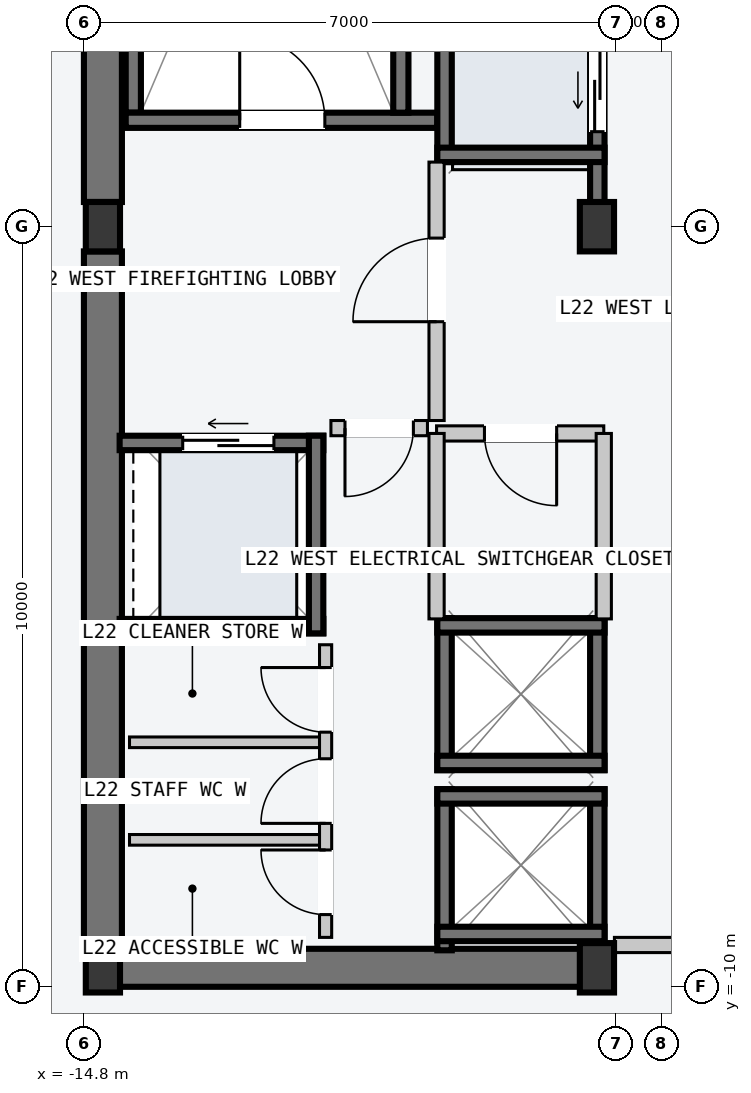
"""IFC4 building model, lengths in metres.
Left out: names, types, materials, properties, quantities, classifications, styles, units other than length and angle.
Written with IfcOpenShell. Run it as: python <this file> out.ifc"""

import sys

from ifc_helpers import new_model, si_unit, direction, frame, frame_2d, origin, origin_2d, place, context, subcontext, project, spatial, rectangle, i_section, extrude, element, fill, save


model = new_model("IFC4")
c1 = context("Model", 3, precision=1e-05, world=origin(), true_north=direction((0.0, 1.0)))
c2 = subcontext(c1, "Body", "Model", "MODEL_VIEW")
j1 = project(units=[si_unit("LENGTHUNIT", "METRE"), si_unit("PLANEANGLEUNIT", "RADIAN")], contexts=[c1])
p1 = place(None, origin())
s1 = spatial("IfcSite", under=j1, at=p1, CompositionType="ELEMENT")
p2 = place(p1, origin())
s2 = spatial("IfcBuilding", under=s1, at=p2, CompositionType="ELEMENT")
p3 = place(p2, frame((0.0, 0.0, 87.3)))
s3 = spatial("IfcBuildingStorey", under=s2, at=p3, CompositionType="ELEMENT", Elevation=87.3)
p4 = place(p3, frame((-14.53, -9.75, -0.2), z_axis=(0.0, 0.0, 1.0), x_axis=(1.0, 0.0, 0.0)))
e1 = element("IfcWall", 1, at=p4, inside=s3, PredefinedType="SHEAR", context=c2, shape_type="SweptSolid", body=[
    extrude(rectangle(XDim=6.46, YDim=0.5, at=frame_2d((3.23, 0.0))), origin(), (0.0, 0.0, 1.0), 4.5),
])
for number, where, z_axis, x_axis in (
    (2, (-14.55, -9.425, -0.2), (0.0, 0.0, 1.0), (0.0, 1.0, 0.0)),
    (3, (-14.55, 0.325, -0.2), (0.0, 0.0, 1.0), (0.0, 1.0, 0.0)),
):
    element("IfcWall", number, at=place(p3, frame(where, z_axis=z_axis, x_axis=x_axis)), inside=s3, PredefinedType="SHEAR", context=c2, shape_type="SweptSolid", body=[
        extrude(rectangle(XDim=9.1, YDim=0.5, at=frame_2d((4.55, 0.0))), origin(), (0.0, 0.0, 1.0), 4.5),
    ])
p5 = place(p3, frame((-14.15, 1.5, -0.2), z_axis=(0.0, 0.0, 1.0), x_axis=(0.0, 1.0, 0.0)))
e4 = element("IfcWall", 4, at=p5, inside=s3, PredefinedType="SOLIDWALL", context=c2, shape_type="SweptSolid", body=[
    extrude(rectangle(XDim=7.8, YDim=0.2, at=frame_2d((3.9, 0.0))), origin(), (0.0, 0.0, 1.0), 4.5),
])
p6 = place(p3, frame((-14.25, 1.4, -0.2), z_axis=(0.0, 0.0, 1.0), x_axis=(1.0, 0.0, 0.0)))
e5 = element("IfcWall", 5, at=p6, inside=s3, PredefinedType="SOLIDWALL", context=c2, shape_type="SweptSolid", body=[
    extrude(rectangle(XDim=4.1, YDim=0.2, at=frame_2d((2.05, 0.0))), origin(), (0.0, 0.0, 1.0), 4.5),
])
p7 = place(p6, frame((1.5, 0.0, 0.2)))
e6 = element("IfcOpeningElement", 6, at=p7, cuts=e5, PredefinedType="OPENING", context=c2, shape_type="SweptSolid", body=[
    extrude(rectangle(XDim=1.12, YDim=2.18, at=frame_2d((0.56, 1.09))), frame((0.0, 0.11, 0.0), z_axis=(0.0, -1.0, 0.0), x_axis=(1.0, 0.0, 0.0)), (0.0, 0.0, 1.0), 0.22),
])
p8 = place(p3, frame((-10.63, 1.5, -0.2), z_axis=(0.0, 0.0, 1.0), x_axis=(0.0, 1.0, 0.0)))
e7 = element("IfcWall", 7, at=p8, inside=s3, PredefinedType="SOLIDWALL", context=c2, shape_type="SweptSolid", body=[
    extrude(rectangle(XDim=7.8, YDim=0.2, at=frame_2d((3.9, 0.0))), origin(), (0.0, 0.0, 1.0), 4.5),
])
for number, where, z_axis, x_axis in (
    (8, (-14.55, -9.75, 0.0), (0.0, 0.0, 1.0), (1.0, 0.0, 0.0)),
    (9, (-14.55, 0.0, 0.0), (0.0, 0.0, 1.0), (1.0, 0.0, 0.0)),
    (10, (-8.05, -9.75, 0.0), (0.0, 0.0, 1.0), (1.0, 0.0, 0.0)),
    (11, (-8.05, 0.0, 0.0), (0.0, 0.0, 1.0), (1.0, 0.0, 0.0)),
):
    element("IfcColumn", number, at=place(p3, frame(where, z_axis=z_axis, x_axis=x_axis)), inside=s3, PredefinedType="COLUMN", context=c2, shape_type="SweptSolid", body=[
        extrude(i_section(OverallWidth=0.45, OverallDepth=0.65, WebThickness=0.025, FlangeThickness=0.04, at=origin_2d()), origin(), (0.0, 0.0, 1.0), 4.5),
    ])
p9 = place(p3, frame((-8.045, 0.21, -0.2), z_axis=(0.0, 0.0, 1.0), x_axis=(0.0, 1.0, 0.0)))
e12 = element("IfcWall", 12, at=p9, inside=s3, PredefinedType="SOLIDWALL", context=c2, shape_type="SweptSolid", body=[
    extrude(rectangle(XDim=2.54, YDim=0.19, at=frame_2d((1.27, 0.0))), origin(), (0.0, 0.0, 1.0), 4.5),
])
p10 = place(p9, frame((1.04, 0.0, 0.2)))
e13 = element("IfcOpeningElement", 13, at=p10, cuts=e12, PredefinedType="OPENING", context=c2, shape_type="SweptSolid", body=[
    extrude(rectangle(XDim=1.1, YDim=2.2, at=frame_2d((0.55, 1.1))), frame((0.0, 0.105, 0.0), z_axis=(0.0, -1.0, 0.0), x_axis=(1.0, 0.0, 0.0)), (0.0, 0.0, 1.0), 0.21),
])
p11 = place(p3, frame((-10.055, 0.85, -0.2), z_axis=(0.0, 0.0, 1.0), x_axis=(0.0, 1.0, 0.0)))
e14 = element("IfcWall", 14, at=p11, inside=s3, PredefinedType="SOLIDWALL", context=c2, shape_type="SweptSolid", body=[
    extrude(rectangle(XDim=1.9, YDim=0.19, at=frame_2d((0.95, 0.0))), origin(), (0.0, 0.0, 1.0), 4.5),
])
p12 = place(p3, frame((-10.15, 0.945, -0.2), z_axis=(0.0, 0.0, 1.0), x_axis=(1.0, 0.0, 0.0)))
e15 = element("IfcWall", 15, at=p12, inside=s3, PredefinedType="SOLIDWALL", context=c2, shape_type="SweptSolid", body=[
    extrude(rectangle(XDim=2.2, YDim=0.19, at=frame_2d((1.1, 0.0))), origin(), (0.0, 0.0, 1.0), 4.5),
])
for number, where, z_axis, x_axis in (
    (16, (-8.045, -9.52, -0.2), (0.0, 0.0, 1.0), (0.0, 1.0, 0.0)),
    (17, (-10.055, -9.52, -0.2), (0.0, 0.0, 1.0), (0.0, 1.0, 0.0)),
):
    element("IfcWall", number, at=place(p3, frame(where, z_axis=z_axis, x_axis=x_axis)), inside=s3, PredefinedType="SOLIDWALL", context=c2, shape_type="SweptSolid", body=[
        extrude(rectangle(XDim=2.12, YDim=0.19, at=frame_2d((1.06, 0.0))), origin(), (0.0, 0.0, 1.0), 4.5),
    ])
for number, where, z_axis, x_axis in (
    (18, (-10.15, -7.495, -0.2), (0.0, 0.0, 1.0), (1.0, 0.0, 0.0)),
    (19, (-10.15, -9.305, -0.2), (0.0, 0.0, 1.0), (1.0, 0.0, 0.0)),
):
    element("IfcWall", number, at=place(p3, frame(where, z_axis=z_axis, x_axis=x_axis)), inside=s3, PredefinedType="SOLIDWALL", context=c2, shape_type="SweptSolid", body=[
        extrude(rectangle(XDim=2.2, YDim=0.19, at=frame_2d((1.1, 0.0))), origin(), (0.0, 0.0, 1.0), 4.5),
    ])
for number, where, z_axis, x_axis in (
    (20, (-8.045, -7.15, -0.2), (0.0, 0.0, 1.0), (0.0, 1.0, 0.0)),
    (21, (-10.055, -7.15, -0.2), (0.0, 0.0, 1.0), (0.0, 1.0, 0.0)),
):
    element("IfcWall", number, at=place(p3, frame(where, z_axis=z_axis, x_axis=x_axis)), inside=s3, PredefinedType="SOLIDWALL", context=c2, shape_type="SweptSolid", body=[
        extrude(rectangle(XDim=2.0, YDim=0.19, at=frame_2d((1.0, 0.0))), origin(), (0.0, 0.0, 1.0), 4.5),
    ])
for number, where, z_axis, x_axis in (
    (22, (-10.15, -5.245, -0.2), (0.0, 0.0, 1.0), (1.0, 0.0, 0.0)),
    (23, (-10.15, -7.055, -0.2), (0.0, 0.0, 1.0), (1.0, 0.0, 0.0)),
):
    element("IfcWall", number, at=place(p3, frame(where, z_axis=z_axis, x_axis=x_axis)), inside=s3, PredefinedType="SOLIDWALL", context=c2, shape_type="SweptSolid", body=[
        extrude(rectangle(XDim=2.2, YDim=0.19, at=frame_2d((1.1, 0.0))), origin(), (0.0, 0.0, 1.0), 4.5),
    ])
p13 = place(p3, frame((-14.33, -2.845, -0.2), z_axis=(0.0, 0.0, 1.0), x_axis=(1.0, 0.0, 0.0)))
e24 = element("IfcWall", 24, at=p13, inside=s3, PredefinedType="SOLIDWALL", context=c2, shape_type="SweptSolid", body=[
    extrude(rectangle(XDim=2.68, YDim=0.19, at=frame_2d((1.34, 0.0))), origin(), (0.0, 0.0, 1.0), 4.5),
])
p14 = place(p13, frame((0.83, 0.0, 0.2)))
e25 = element("IfcOpeningElement", 25, at=p14, cuts=e24, PredefinedType="OPENING", context=c2, shape_type="SweptSolid", body=[
    extrude(rectangle(XDim=1.2, YDim=2.2, at=frame_2d((0.6, 1.1))), frame((0.0, 0.105, 0.0), z_axis=(0.0, -1.0, 0.0), x_axis=(1.0, 0.0, 0.0)), (0.0, 0.0, 1.0), 0.21),
])
p15 = place(p3, frame((-14.33, -5.255, -0.2), z_axis=(0.0, 0.0, 1.0), x_axis=(1.0, 0.0, 0.0)))
e26 = element("IfcWall", 26, at=p15, inside=s3, PredefinedType="SOLIDWALL", context=c2, shape_type="SweptSolid", body=[
    extrude(rectangle(XDim=2.68, YDim=0.19, at=frame_2d((1.34, 0.0))), origin(), (0.0, 0.0, 1.0), 4.5),
])
p16 = place(p3, frame((-11.745, -5.35, -0.2), z_axis=(0.0, 0.0, 1.0), x_axis=(0.0, 1.0, 0.0)))
e27 = element("IfcWall", 27, at=p16, inside=s3, PredefinedType="SOLIDWALL", context=c2, shape_type="SweptSolid", body=[
    extrude(rectangle(XDim=2.6, YDim=0.19, at=frame_2d((1.3, 0.0))), origin(), (0.0, 0.0, 1.0), 4.5),
])
p17 = place(p3, frame((-6.02, -9.45, 0.0), z_axis=(0.0, 0.0, 1.0), x_axis=(-1.0, 0.0, 0.0)))
e28 = element("IfcWall", 28, at=p17, inside=s3, PredefinedType="PARTITIONING", context=c2, shape_type="SweptSolid", body=[
    extrude(rectangle(XDim=1.8, YDim=0.2, at=frame_2d((0.9, 0.0))), origin(), (0.0, 0.0, 1.0), 4.3),
])
p18 = place(p3, frame((-10.16, -2.55, 0.0), z_axis=(0.0, 0.0, 1.0), x_axis=(0.0, 1.0, 0.0)))
e29 = element("IfcWall", 29, at=p18, inside=s3, PredefinedType="PARTITIONING", context=c2, shape_type="SweptSolid", body=[
    extrude(rectangle(XDim=3.4, YDim=0.2, at=frame_2d((1.7, 0.0))), origin(), (0.0, 0.0, 1.0), 4.3),
])
p19 = place(p18, frame((1.3, 0.0, 0.0)))
e30 = element("IfcOpeningElement", 30, at=p19, cuts=e29, PredefinedType="OPENING", context=c2, shape_type="SweptSolid", body=[
    extrude(rectangle(XDim=1.1, YDim=2.15, at=frame_2d((0.55, 1.075))), frame((0.0, 0.11, 0.0), z_axis=(0.0, -1.0, 0.0), x_axis=(1.0, 0.0, 0.0)), (0.0, 0.0, 1.0), 0.22),
])
p20 = place(p3, frame((-10.28, -2.65, 0.0), z_axis=(0.0, 0.0, 1.0), x_axis=(-1.0, 0.0, 0.0)))
e31 = element("IfcWall", 31, at=p20, inside=s3, PredefinedType="PARTITIONING", context=c2, shape_type="SweptSolid", body=[
    extrude(rectangle(XDim=1.27, YDim=0.2, at=frame_2d((0.635, 0.0))), origin(), (0.0, 0.0, 1.0), 4.3),
])
p21 = place(p20, frame((0.185, 0.0, 0.0)))
e32 = element("IfcOpeningElement", 32, at=p21, cuts=e31, PredefinedType="OPENING", context=c2, shape_type="SweptSolid", body=[
    extrude(rectangle(XDim=0.9, YDim=2.15, at=frame_2d((0.45, 1.075))), frame((0.0, 0.11, 0.0), z_axis=(0.0, -1.0, 0.0), x_axis=(1.0, 0.0, 0.0)), (0.0, 0.0, 1.0), 0.22),
])
p22 = place(p3, frame((-7.96, -2.72, 0.0), z_axis=(0.0, 0.0, 1.0), x_axis=(-1.0, 0.0, 0.0)))
e33 = element("IfcWall", 33, at=p22, inside=s3, PredefinedType="PARTITIONING", context=c2, shape_type="SweptSolid", body=[
    extrude(rectangle(XDim=2.2, YDim=0.2, at=frame_2d((1.1, 0.0))), origin(), (0.0, 0.0, 1.0), 4.3),
])
p23 = place(p22, frame((0.62, 0.0, 0.0)))
e34 = element("IfcOpeningElement", 34, at=p23, cuts=e33, PredefinedType="OPENING", context=c2, shape_type="SweptSolid", body=[
    extrude(rectangle(XDim=0.95, YDim=2.1, at=frame_2d((0.475, 1.05))), frame((0.0, 0.11, 0.0), z_axis=(0.0, -1.0, 0.0), x_axis=(1.0, 0.0, 0.0)), (0.0, 0.0, 1.0), 0.22),
])
for number, where, z_axis, x_axis in (
    (35, (-7.96, -5.16, 0.0), (0.0, 0.0, 1.0), (0.0, 1.0, 0.0)),
    (36, (-10.16, -5.16, 0.0), (0.0, 0.0, 1.0), (0.0, 1.0, 0.0)),
):
    element("IfcWall", number, at=place(p3, frame(where, z_axis=z_axis, x_axis=x_axis)), inside=s3, PredefinedType="PARTITIONING", context=c2, shape_type="SweptSolid", body=[
        extrude(rectangle(XDim=2.44, YDim=0.2, at=frame_2d((1.22, 0.0))), origin(), (0.0, 0.0, 1.0), 4.3),
    ])
for number, where, z_axis, x_axis in (
    (37, (-11.7, -8.067, 0.0), (0.0, 0.0, 1.0), (-1.0, 0.0, 0.0)),
    (38, (-11.7, -6.783, 0.0), (0.0, 0.0, 1.0), (-1.0, 0.0, 0.0)),
):
    element("IfcWall", number, at=place(p3, frame(where, z_axis=z_axis, x_axis=x_axis)), inside=s3, PredefinedType="PARTITIONING", context=c2, shape_type="SweptSolid", body=[
        extrude(rectangle(XDim=2.5, YDim=0.14, at=frame_2d((1.25, 0.0))), origin(), (0.0, 0.0, 1.0), 4.3),
    ])
p24 = place(p3, frame((-11.62, -9.35, 0.0), z_axis=(0.0, 0.0, 1.0), x_axis=(0.0, 1.0, 0.0)))
e39 = element("IfcWall", 39, at=p24, inside=s3, PredefinedType="PARTITIONING", context=c2, shape_type="SweptSolid", body=[
    extrude(rectangle(XDim=3.85, YDim=0.16, at=frame_2d((1.925, 0.0))), origin(), (0.0, 0.0, 1.0), 4.3),
])
p25 = place(p24, frame((0.3, 0.0, 0.0)))
e40 = element("IfcOpeningElement", 40, at=p25, cuts=e39, PredefinedType="OPENING", context=c2, shape_type="SweptSolid", body=[
    extrude(rectangle(XDim=0.85, YDim=2.12, at=frame_2d((0.425, 1.06))), frame((0.0, 0.09, 0.0), z_axis=(0.0, -1.0, 0.0), x_axis=(1.0, 0.0, 0.0)), (0.0, 0.0, 1.0), 0.18),
])
p26 = place(p24, frame((1.5, 0.0, 0.0)))
e41 = element("IfcOpeningElement", 41, at=p26, cuts=e39, PredefinedType="OPENING", context=c2, shape_type="SweptSolid", body=[
    extrude(rectangle(XDim=0.85, YDim=2.12, at=frame_2d((0.425, 1.06))), frame((0.0, 0.09, 0.0), z_axis=(0.0, -1.0, 0.0), x_axis=(1.0, 0.0, 0.0)), (0.0, 0.0, 1.0), 0.18),
])
p27 = place(p24, frame((2.7, 0.0, 0.0)))
e42 = element("IfcOpeningElement", 42, at=p27, cuts=e39, PredefinedType="OPENING", context=c2, shape_type="SweptSolid", body=[
    extrude(rectangle(XDim=0.85, YDim=2.12, at=frame_2d((0.425, 1.06))), frame((0.0, 0.09, 0.0), z_axis=(0.0, -1.0, 0.0), x_axis=(1.0, 0.0, 0.0)), (0.0, 0.0, 1.0), 0.18),
])
p28 = place(p7, origin())
e43 = element("IfcDoor", 43, at=p28, inside=s3, OperationType="SINGLE_SWING_LEFT", PredefinedType="DOOR", context=c2, shape_type="SweptSolid", body=[
    extrude(rectangle(XDim=1.12, YDim=2.18, at=frame_2d((0.56, 1.09))), frame((0.0, 0.025, 0.0), z_axis=(0.0, -1.0, 0.0), x_axis=(1.0, 0.0, 0.0)), (0.0, 0.0, 1.0), 0.05),
])
fill(e6, e43)
p29 = place(p10, origin())
e44 = element("IfcDoor", 44, at=p29, inside=s3, OperationType="SLIDING_TO_LEFT", PredefinedType="DOOR", context=c2, shape_type="SweptSolid", body=[
    extrude(rectangle(XDim=1.1, YDim=2.2, at=frame_2d((0.55, 1.1))), frame((0.0, 0.025, 0.0), z_axis=(0.0, -1.0, 0.0), x_axis=(1.0, 0.0, 0.0)), (0.0, 0.0, 1.0), 0.05),
])
fill(e13, e44)
p30 = place(p14, origin())
e45 = element("IfcDoor", 45, at=p30, inside=s3, OperationType="SLIDING_TO_LEFT", PredefinedType="DOOR", context=c2, shape_type="SweptSolid", body=[
    extrude(rectangle(XDim=1.2, YDim=2.2, at=frame_2d((0.6, 1.1))), frame((0.0, 0.025, 0.0), z_axis=(0.0, -1.0, 0.0), x_axis=(1.0, 0.0, 0.0)), (0.0, 0.0, 1.0), 0.05),
])
fill(e25, e45)
p31 = place(p19, origin())
e46 = element("IfcDoor", 46, at=p31, inside=s3, OperationType="SINGLE_SWING_LEFT", PredefinedType="DOOR", context=c2, shape_type="SweptSolid", body=[
    extrude(rectangle(XDim=1.1, YDim=2.15, at=frame_2d((0.55, 1.075))), frame((0.0, 0.025, 0.0), z_axis=(0.0, -1.0, 0.0), x_axis=(1.0, 0.0, 0.0)), (0.0, 0.0, 1.0), 0.05),
])
fill(e30, e46)
p32 = place(p21, origin())
e47 = element("IfcDoor", 47, at=p32, inside=s3, OperationType="SINGLE_SWING_RIGHT", PredefinedType="DOOR", context=c2, shape_type="SweptSolid", body=[
    extrude(rectangle(XDim=0.9, YDim=2.15, at=frame_2d((0.45, 1.075))), frame((0.0, 0.025, 0.0), z_axis=(0.0, -1.0, 0.0), x_axis=(1.0, 0.0, 0.0)), (0.0, 0.0, 1.0), 0.05),
])
fill(e32, e47)
p33 = place(p23, origin())
e48 = element("IfcDoor", 48, at=p33, inside=s3, OperationType="SINGLE_SWING_LEFT", PredefinedType="DOOR", context=c2, shape_type="SweptSolid", body=[
    extrude(rectangle(XDim=0.95, YDim=2.1, at=frame_2d((0.475, 1.05))), frame((0.0, 0.025, 0.0), z_axis=(0.0, -1.0, 0.0), x_axis=(1.0, 0.0, 0.0)), (0.0, 0.0, 1.0), 0.05),
])
fill(e34, e48)
p34 = place(p25, origin())
e49 = element("IfcDoor", 49, at=p34, inside=s3, OperationType="SINGLE_SWING_RIGHT", PredefinedType="DOOR", context=c2, shape_type="SweptSolid", body=[
    extrude(rectangle(XDim=0.85, YDim=2.12, at=frame_2d((0.425, 1.06))), frame((0.0, 0.025, 0.0), z_axis=(0.0, -1.0, 0.0), x_axis=(1.0, 0.0, 0.0)), (0.0, 0.0, 1.0), 0.05),
])
fill(e40, e49)
p35 = place(p26, origin())
e50 = element("IfcDoor", 50, at=p35, inside=s3, OperationType="SINGLE_SWING_LEFT", PredefinedType="DOOR", context=c2, shape_type="SweptSolid", body=[
    extrude(rectangle(XDim=0.85, YDim=2.12, at=frame_2d((0.425, 1.06))), frame((0.0, 0.025, 0.0), z_axis=(0.0, -1.0, 0.0), x_axis=(1.0, 0.0, 0.0)), (0.0, 0.0, 1.0), 0.05),
])
fill(e41, e50)
p36 = place(p27, origin())
e51 = element("IfcDoor", 51, at=p36, inside=s3, OperationType="SINGLE_SWING_RIGHT", PredefinedType="DOOR", context=c2, shape_type="SweptSolid", body=[
    extrude(rectangle(XDim=0.85, YDim=2.12, at=frame_2d((0.425, 1.06))), frame((0.0, 0.025, 0.0), z_axis=(0.0, -1.0, 0.0), x_axis=(1.0, 0.0, 0.0)), (0.0, 0.0, 1.0), 0.05),
])
fill(e42, e51)
save(model, sys.argv[1])
